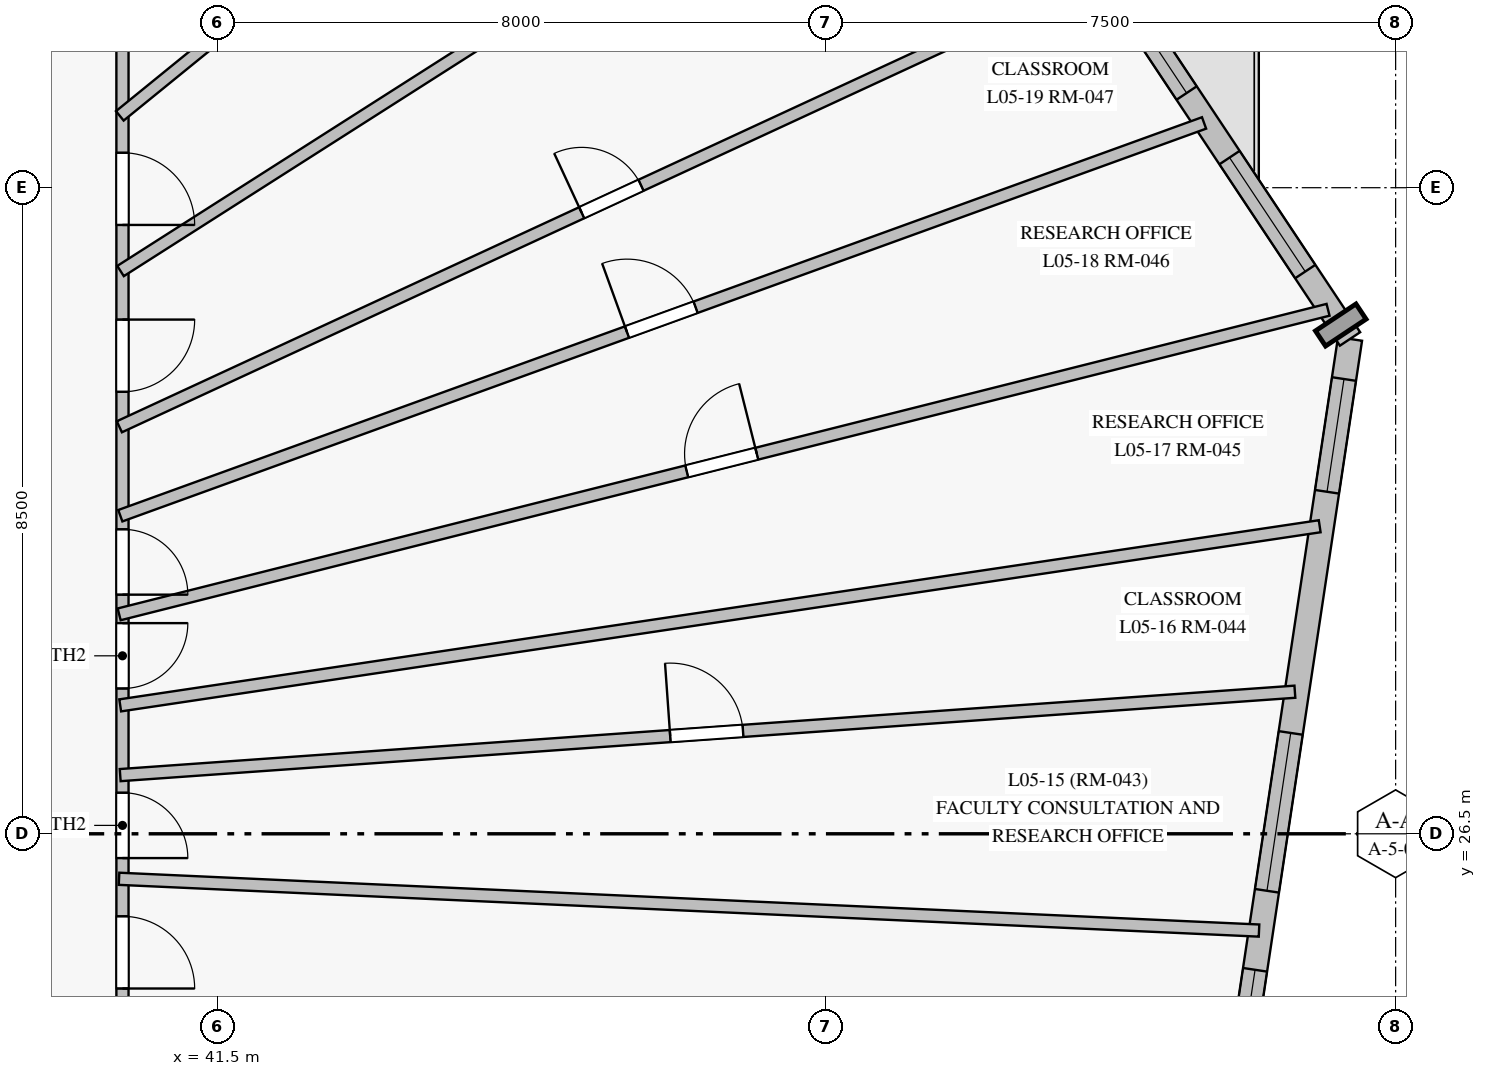
"""IFC4 building model, lengths in metres.
Left out: names, types, materials, properties, quantities, classifications, styles, units other than length and angle.
Written with IfcOpenShell. Run it as: python <this file> out.ifc"""

import sys

from ifc_helpers import new_model, si_unit, direction, frame, frame_2d, origin, origin_with_axes, place, context, subcontext, project, spatial, rectangle, extrude, source, transform, mapped, element, fill, save


model = new_model("IFC4")
c1 = context("Model", 3, precision=1e-05, world=origin(), true_north=direction((0.0, 1.0)))
c2 = subcontext(c1, "Body", "Model", "MODEL_VIEW")
j1 = project(units=[si_unit("LENGTHUNIT", "METRE"), si_unit("PLANEANGLEUNIT", "RADIAN")], contexts=[c1])
p1 = place(None, origin())
s1 = spatial("IfcSite", under=j1, at=p1, CompositionType="ELEMENT")
p2 = place(p1, origin())
s2 = spatial("IfcBuilding", under=s1, at=p2, CompositionType="ELEMENT")
p3 = place(p2, frame((0.0, 0.0, 22.5)))
s3 = spatial("IfcBuildingStorey", under=s2, at=p3, CompositionType="ELEMENT", Elevation=22.5)
p4 = place(p3, frame((54.797, 22.363, 0.0), z_axis=(0.0, 0.0, 1.0), x_axis=(0.148832722849, 0.988862387094, 0.0)))
e1 = element("IfcWall", 1, at=p4, inside=s3, PredefinedType="SOLIDWALL", context=c2, shape_type="SweptSolid", body=[
    extrude(rectangle(XDim=10.767, YDim=0.32, at=frame_2d((5.384, 0.0))), origin(), (0.0, 0.0, 1.0), 3.75),
])
p5 = place(p4, frame((0.574, 0.0, 0.85)))
e2 = element("IfcOpeningElement", 2, at=p5, cuts=e1, PredefinedType="OPENING", context=c2, shape_type="SweptSolid", body=[
    extrude(rectangle(XDim=1.8, YDim=1.85, at=frame_2d((0.9, 0.925))), frame((0.0, 0.17, 0.0), z_axis=(0.0, -1.0, 0.0), x_axis=(1.0, 0.0, 0.0)), (0.0, 0.0, 1.0), 0.34),
])
p6 = place(p4, frame((3.426, 0.0, 0.85)))
e3 = element("IfcOpeningElement", 3, at=p6, cuts=e1, PredefinedType="OPENING", context=c2, shape_type="SweptSolid", body=[
    extrude(rectangle(XDim=2.1, YDim=1.95, at=frame_2d((1.05, 0.975))), frame((0.0, 0.17, 0.0), z_axis=(0.0, -1.0, 0.0), x_axis=(1.0, 0.0, 0.0)), (0.0, 0.0, 1.0), 0.34),
])
p7 = place(p4, frame((8.734, 0.0, 0.85)))
e4 = element("IfcOpeningElement", 4, at=p7, cuts=e1, PredefinedType="OPENING", context=c2, shape_type="SweptSolid", body=[
    extrude(rectangle(XDim=1.5, YDim=1.85, at=frame_2d((0.75, 0.925))), frame((0.0, 0.17, 0.0), z_axis=(0.0, -1.0, 0.0), x_axis=(1.0, 0.0, 0.0)), (0.0, 0.0, 1.0), 0.34),
])
p8 = place(p3, frame((56.4, 33.01, 0.0), z_axis=(0.0, 0.0, 1.0), x_axis=(-0.553428968968, 0.832896377893, 0.0)))
e5 = element("IfcWall", 5, at=p8, inside=s3, PredefinedType="SOLIDWALL", context=c2, shape_type="SweptSolid", body=[
    extrude(rectangle(XDim=13.391, YDim=0.32, at=frame_2d((6.696, 0.0))), origin(), (0.0, 0.0, 1.0), 3.75),
])
p9 = place(p8, frame((1.064, 0.0, 0.85)))
e6 = element("IfcOpeningElement", 6, at=p9, cuts=e5, PredefinedType="OPENING", context=c2, shape_type="SweptSolid", body=[
    extrude(rectangle(XDim=1.8, YDim=1.85, at=frame_2d((0.9, 0.925))), frame((0.0, 0.17, 0.0), z_axis=(0.0, -1.0, 0.0), x_axis=(1.0, 0.0, 0.0)), (0.0, 0.0, 1.0), 0.34),
])
p10 = place(p8, frame((3.884, 0.0, 0.85)))
e7 = element("IfcOpeningElement", 7, at=p10, cuts=e5, PredefinedType="OPENING", context=c2, shape_type="SweptSolid", body=[
    extrude(rectangle(XDim=1.5, YDim=1.85, at=frame_2d((0.75, 0.925))), frame((0.0, 0.17, 0.0), z_axis=(0.0, -1.0, 0.0), x_axis=(1.0, 0.0, 0.0)), (0.0, 0.0, 1.0), 0.34),
])
p11 = place(p8, frame((6.591, 0.0, 0.85)))
e8 = element("IfcOpeningElement", 8, at=p11, cuts=e5, PredefinedType="OPENING", context=c2, shape_type="SweptSolid", body=[
    extrude(rectangle(XDim=2.1, YDim=1.95, at=frame_2d((1.05, 0.975))), frame((0.0, 0.17, 0.0), z_axis=(0.0, -1.0, 0.0), x_axis=(1.0, 0.0, 0.0)), (0.0, 0.0, 1.0), 0.34),
])
p12 = place(p8, frame((9.945, 0.0, 0.85)))
e9 = element("IfcOpeningElement", 9, at=p12, cuts=e5, PredefinedType="OPENING", context=c2, shape_type="SweptSolid", body=[
    extrude(rectangle(XDim=2.1, YDim=1.95, at=frame_2d((1.05, 0.975))), frame((0.0, 0.17, 0.0), z_axis=(0.0, -1.0, 0.0), x_axis=(1.0, 0.0, 0.0)), (0.0, 0.0, 1.0), 0.34),
])
p13 = place(p3, frame((40.25, 37.65, 0.0), z_axis=(0.0, 0.0, 1.0), x_axis=(0.0, -1.0, 0.0)))
e10 = element("IfcWall", 10, at=p13, inside=s3, PredefinedType="PARTITIONING", context=c2, shape_type="SweptSolid", body=[
    extrude(rectangle(XDim=22.3, YDim=0.16, at=frame_2d((11.15, 0.0))), origin(), (0.0, 0.0, 1.0), 3.15),
])
p14 = place(p13, frame((16.25, 0.0, 0.0)))
e11 = element("IfcOpeningElement", 11, at=p14, cuts=e10, PredefinedType="OPENING", context=c2, shape_type="SweptSolid", body=[
    extrude(rectangle(XDim=0.95, YDim=2.15, at=frame_2d((0.475, 1.075))), frame((0.0, 0.09, 0.0), z_axis=(0.0, -1.0, 0.0), x_axis=(1.0, 0.0, 0.0)), (0.0, 0.0, 1.0), 0.18),
])
p15 = place(p13, frame((14.06, 0.0, 0.0)))
e12 = element("IfcOpeningElement", 12, at=p15, cuts=e10, PredefinedType="OPENING", context=c2, shape_type="SweptSolid", body=[
    extrude(rectangle(XDim=0.96, YDim=2.15, at=frame_2d((0.48, 1.075))), frame((0.0, 0.09, 0.0), z_axis=(0.0, -1.0, 0.0), x_axis=(1.0, 0.0, 0.0)), (0.0, 0.0, 1.0), 0.18),
])
p16 = place(p13, frame((12.235, 0.0, 0.0)))
e13 = element("IfcOpeningElement", 13, at=p16, cuts=e10, PredefinedType="OPENING", context=c2, shape_type="SweptSolid", body=[
    extrude(rectangle(XDim=0.95, YDim=2.15, at=frame_2d((0.475, 1.075))), frame((0.0, 0.09, 0.0), z_axis=(0.0, -1.0, 0.0), x_axis=(1.0, 0.0, 0.0)), (0.0, 0.0, 1.0), 0.18),
])
p17 = place(p13, frame((4.385, 0.0, 0.0)))
e14 = element("IfcOpeningElement", 14, at=p17, cuts=e10, PredefinedType="OPENING", context=c2, shape_type="SweptSolid", body=[
    extrude(rectangle(XDim=0.95, YDim=2.15, at=frame_2d((0.475, 1.075))), frame((0.0, 0.09, 0.0), z_axis=(0.0, -1.0, 0.0), x_axis=(1.0, 0.0, 0.0)), (0.0, 0.0, 1.0), 0.18),
])
p18 = place(p13, frame((2.19, 0.0, 0.0)))
e15 = element("IfcOpeningElement", 15, at=p18, cuts=e10, PredefinedType="OPENING", context=c2, shape_type="SweptSolid", body=[
    extrude(rectangle(XDim=0.95, YDim=2.15, at=frame_2d((0.475, 1.075))), frame((0.0, 0.09, 0.0), z_axis=(0.0, -1.0, 0.0), x_axis=(1.0, 0.0, 0.0)), (0.0, 0.0, 1.0), 0.18),
])
p19 = place(p13, frame((17.358, 0.0, 0.0)))
e16 = element("IfcOpeningElement", 16, at=p19, cuts=e10, PredefinedType="OPENING", context=c2, shape_type="SweptSolid", body=[
    extrude(rectangle(XDim=0.95, YDim=2.15, at=frame_2d((0.475, 1.075))), frame((0.0, 0.09, 0.0), z_axis=(0.0, -1.0, 0.0), x_axis=(1.0, 0.0, 0.0)), (0.0, 0.0, 1.0), 0.18),
])
p20 = place(p13, frame((18.489, 0.0, 0.0)))
e17 = element("IfcOpeningElement", 17, at=p20, cuts=e10, PredefinedType="OPENING", context=c2, shape_type="SweptSolid", body=[
    extrude(rectangle(XDim=0.95, YDim=2.15, at=frame_2d((0.475, 1.075))), frame((0.0, 0.09, 0.0), z_axis=(0.0, -1.0, 0.0), x_axis=(1.0, 0.0, 0.0)), (0.0, 0.0, 1.0), 0.18),
])
p21 = place(p13, frame((10.61, 0.0, 0.0)))
e18 = element("IfcOpeningElement", 18, at=p21, cuts=e10, PredefinedType="OPENING", context=c2, shape_type="SweptSolid", body=[
    extrude(rectangle(XDim=0.86, YDim=2.04, at=frame_2d((0.43, 1.02))), frame((0.0, 0.09, 0.0), z_axis=(0.0, -1.0, 0.0), x_axis=(1.0, 0.0, 0.0)), (0.0, 0.0, 1.0), 0.18),
])
p22 = place(p13, frame((8.378, 0.0, 0.0)))
e19 = element("IfcOpeningElement", 19, at=p22, cuts=e10, PredefinedType="OPENING", context=c2, shape_type="SweptSolid", body=[
    extrude(rectangle(XDim=0.86, YDim=2.04, at=frame_2d((0.43, 1.02))), frame((0.0, 0.09, 0.0), z_axis=(0.0, -1.0, 0.0), x_axis=(1.0, 0.0, 0.0)), (0.0, 0.0, 1.0), 0.18),
])
p23 = place(p13, frame((7.144, 0.0, 0.0)))
e20 = element("IfcOpeningElement", 20, at=p23, cuts=e10, PredefinedType="OPENING", context=c2, shape_type="SweptSolid", body=[
    extrude(rectangle(XDim=0.86, YDim=2.04, at=frame_2d((0.43, 1.02))), frame((0.0, 0.09, 0.0), z_axis=(0.0, -1.0, 0.0), x_axis=(1.0, 0.0, 0.0)), (0.0, 0.0, 1.0), 0.18),
])
p24 = place(p3, frame((40.206, 29.387, 0.0), z_axis=(0.0, 0.0, 1.0), x_axis=(0.969703998049, 0.24428294285, 0.0)))
e21 = element("IfcWall", 21, at=p24, inside=s3, PredefinedType="PARTITIONING", context=c2, shape_type="SweptSolid", body=[
    extrude(rectangle(XDim=16.401, YDim=0.16, at=frame_2d((8.201, 0.0))), origin(), (0.0, 0.0, 1.0), 3.75),
])
p25 = place(p24, frame((7.701, 0.0, 0.0)))
e22 = element("IfcOpeningElement", 22, at=p25, cuts=e21, PredefinedType="OPENING", context=c2, shape_type="SweptSolid", body=[
    extrude(rectangle(XDim=0.95, YDim=2.15, at=frame_2d((0.475, 1.075))), frame((0.0, 0.09, 0.0), z_axis=(0.0, -1.0, 0.0), x_axis=(1.0, 0.0, 0.0)), (0.0, 0.0, 1.0), 0.18),
])
p26 = place(p3, frame((40.22, 28.189, 0.0), z_axis=(0.0, 0.0, 1.0), x_axis=(0.989031993376, 0.147701442372, 0.0)))
e23 = element("IfcWall", 23, at=p26, inside=s3, PredefinedType="PARTITIONING", context=c2, shape_type="SweptSolid", body=[
    extrude(rectangle(XDim=15.956, YDim=0.16, at=frame_2d((7.978, 0.0))), origin(), (0.0, 0.0, 1.0), 3.75),
])
p27 = place(p3, frame((40.22, 27.272, 0.0), z_axis=(0.0, 0.0, 1.0), x_axis=(0.997489402504, 0.070815901405, 0.0)))
e24 = element("IfcWall", 24, at=p27, inside=s3, PredefinedType="PARTITIONING", context=c2, shape_type="SweptSolid", body=[
    extrude(rectangle(XDim=15.493, YDim=0.16, at=frame_2d((7.747, 0.0))), origin(), (0.0, 0.0, 1.0), 3.75),
])
p28 = place(p27, frame((7.254, 0.0, 0.0)))
e25 = element("IfcOpeningElement", 25, at=p28, cuts=e24, PredefinedType="OPENING", context=c2, shape_type="SweptSolid", body=[
    extrude(rectangle(XDim=0.96, YDim=2.15, at=frame_2d((0.48, 1.075))), frame((0.0, 0.09, 0.0), z_axis=(0.0, -1.0, 0.0), x_axis=(1.0, 0.0, 0.0)), (0.0, 0.0, 1.0), 0.18),
])
p29 = place(p3, frame((40.222, 30.685, 0.0), z_axis=(0.0, 0.0, 1.0), x_axis=(0.940161852345, 0.340728178166, 0.0)))
e26 = element("IfcWall", 26, at=p29, inside=s3, PredefinedType="PARTITIONING", context=c2, shape_type="SweptSolid", body=[
    extrude(rectangle(XDim=15.165, YDim=0.16, at=frame_2d((7.583, 0.0))), origin(), (0.0, 0.0, 1.0), 3.75),
])
p30 = place(p29, frame((7.09, 0.0, 0.0)))
e27 = element("IfcOpeningElement", 27, at=p30, cuts=e26, PredefinedType="OPENING", context=c2, shape_type="SweptSolid", body=[
    extrude(rectangle(XDim=0.96, YDim=2.15, at=frame_2d((0.48, 1.075))), frame((0.0, 0.09, 0.0), z_axis=(0.0, -1.0, 0.0), x_axis=(1.0, 0.0, 0.0)), (0.0, 0.0, 1.0), 0.18),
])
p31 = place(p3, frame((40.205, 25.908, 0.0), z_axis=(0.0, 0.0, 1.0), x_axis=(0.998969512327, -0.045386269292, 0.0)))
e28 = element("IfcWall", 28, at=p31, inside=s3, PredefinedType="PARTITIONING", context=c2, shape_type="SweptSolid", body=[
    extrude(rectangle(XDim=15.013, YDim=0.16, at=frame_2d((7.507, 0.0))), origin(), (0.0, 0.0, 1.0), 3.75),
])
p32 = place(p3, frame((40.209, 31.855, 0.0), z_axis=(0.0, 0.0, 1.0), x_axis=(0.907470894389, 0.420114955502, 0.0)))
e29 = element("IfcWall", 29, at=p32, inside=s3, PredefinedType="PARTITIONING", context=c2, shape_type="SweptSolid", body=[
    extrude(rectangle(XDim=14.266, YDim=0.16, at=frame_2d((7.133, 0.0))), origin(), (0.0, 0.0, 1.0), 3.75),
])
p33 = place(p32, frame((6.703, 0.0, 0.0)))
e30 = element("IfcOpeningElement", 30, at=p33, cuts=e29, PredefinedType="OPENING", context=c2, shape_type="SweptSolid", body=[
    extrude(rectangle(XDim=0.86, YDim=2.04, at=frame_2d((0.43, 1.02))), frame((0.0, 0.09, 0.0), z_axis=(0.0, -1.0, 0.0), x_axis=(1.0, 0.0, 0.0)), (0.0, 0.0, 1.0), 0.18),
])
p34 = place(p3, frame((40.225, 33.904, 0.0), z_axis=(0.0, 0.0, 1.0), x_axis=(0.843218121952, 0.537571575524, 0.0)))
e31 = element("IfcWall", 31, at=p34, inside=s3, PredefinedType="PARTITIONING", context=c2, shape_type="SweptSolid", body=[
    extrude(rectangle(XDim=12.955, YDim=0.16, at=frame_2d((6.478, 0.0))), origin(), (0.0, 0.0, 1.0), 3.75),
])
p35 = place(p3, frame((40.215, 35.945, 0.0), z_axis=(0.0, 0.0, 1.0), x_axis=(0.77599360837, 0.630740770657, 0.0)))
e32 = element("IfcWall", 32, at=p35, inside=s3, PredefinedType="PARTITIONING", context=c2, shape_type="SweptSolid", body=[
    extrude(rectangle(XDim=7.506, YDim=0.16, at=frame_2d((3.753, 0.0))), origin(), (0.0, 0.0, 1.0), 3.1),
])
m1 = source(origin_with_axes(), c2, "Body", "SweptSolid", [
    extrude(rectangle(XDim=1.8, YDim=1.85, at=frame_2d((0.9, 0.925))), frame((0.0, 0.03, 0.0), z_axis=(0.0, -1.0, 0.0), x_axis=(1.0, 0.0, 0.0)), (0.0, 0.0, 1.0), 0.06),
])
p36 = place(p5, origin())
e33 = element("IfcWindow", 33, at=p36, inside=s3, PartitioningType="SINGLE_PANEL", PredefinedType="WINDOW", context=c2, shape_type="MappedRepresentation", body=[
    mapped(m1, transform((0.0, 0.0, 0.0), scale=1.0)),
])
fill(e2, e33)
m2 = source(origin_with_axes(), c2, "Body", "SweptSolid", [
    extrude(rectangle(XDim=2.1, YDim=1.95, at=frame_2d((1.05, 0.975))), frame((0.0, 0.03, 0.0), z_axis=(0.0, -1.0, 0.0), x_axis=(1.0, 0.0, 0.0)), (0.0, 0.0, 1.0), 0.06),
])
p37 = place(p6, origin())
e34 = element("IfcWindow", 34, at=p37, inside=s3, PartitioningType="SINGLE_PANEL", PredefinedType="WINDOW", context=c2, shape_type="MappedRepresentation", body=[
    mapped(m2, transform((0.0, 0.0, 0.0), scale=1.0)),
])
fill(e3, e34)
m3 = source(origin_with_axes(), c2, "Body", "SweptSolid", [
    extrude(rectangle(XDim=1.5, YDim=1.85, at=frame_2d((0.75, 0.925))), frame((0.0, 0.03, 0.0), z_axis=(0.0, -1.0, 0.0), x_axis=(1.0, 0.0, 0.0)), (0.0, 0.0, 1.0), 0.06),
])
p38 = place(p7, origin())
e35 = element("IfcWindow", 35, at=p38, inside=s3, PartitioningType="SINGLE_PANEL", PredefinedType="WINDOW", context=c2, shape_type="MappedRepresentation", body=[
    mapped(m3, transform((0.0, 0.0, 0.0), scale=1.0)),
])
fill(e4, e35)
p39 = place(p9, origin())
e36 = element("IfcWindow", 36, at=p39, inside=s3, PartitioningType="SINGLE_PANEL", PredefinedType="WINDOW", context=c2, shape_type="MappedRepresentation", body=[
    mapped(m1, transform((0.0, 0.0, 0.0), scale=1.0)),
])
fill(e6, e36)
p40 = place(p10, origin())
e37 = element("IfcWindow", 37, at=p40, inside=s3, PartitioningType="SINGLE_PANEL", PredefinedType="WINDOW", context=c2, shape_type="MappedRepresentation", body=[
    mapped(m3, transform((0.0, 0.0, 0.0), scale=1.0)),
])
fill(e7, e37)
m4 = source(origin_with_axes(), c2, "Body", "SweptSolid", [
    extrude(rectangle(XDim=0.95, YDim=2.15, at=frame_2d((0.475, 1.075))), frame((0.0, 0.025, 0.0), z_axis=(0.0, -1.0, 0.0), x_axis=(1.0, 0.0, 0.0)), (0.0, 0.0, 1.0), 0.05),
])
p41 = place(p16, origin())
e38 = element("IfcDoor", 38, at=p41, inside=s3, OperationType="SINGLE_SWING_RIGHT", PredefinedType="DOOR", context=c2, shape_type="MappedRepresentation", body=[
    mapped(m4, transform((0.0, 0.0, 0.0), scale=1.0)),
])
fill(e13, e38)
p42 = place(p17, origin())
e39 = element("IfcDoor", 39, at=p42, inside=s3, OperationType="SINGLE_SWING_LEFT", PredefinedType="DOOR", context=c2, shape_type="MappedRepresentation", body=[
    mapped(m4, transform((0.0, 0.0, 0.0), scale=1.0)),
])
fill(e14, e39)
p43 = place(p18, origin())
e40 = element("IfcDoor", 40, at=p43, inside=s3, OperationType="SINGLE_SWING_RIGHT", PredefinedType="DOOR", context=c2, shape_type="MappedRepresentation", body=[
    mapped(m4, transform((0.0, 0.0, 0.0), scale=1.0)),
])
fill(e15, e40)
m5 = source(origin_with_axes(), c2, "Body", "SweptSolid", [
    extrude(rectangle(XDim=0.96, YDim=2.15, at=frame_2d((0.48, 1.075))), frame((0.0, 0.025, 0.0), z_axis=(0.0, -1.0, 0.0), x_axis=(1.0, 0.0, 0.0)), (0.0, 0.0, 1.0), 0.05),
])
p44 = place(p28, origin())
e41 = element("IfcDoor", 41, at=p44, inside=s3, OperationType="SINGLE_SWING_LEFT", PredefinedType="DOOR", context=c2, shape_type="MappedRepresentation", body=[
    mapped(m5, transform((0.0, 0.0, 0.0), scale=1.0)),
])
fill(e25, e41)
p45 = place(p25, origin())
e42 = element("IfcDoor", 42, at=p45, inside=s3, OperationType="SINGLE_SWING_RIGHT", PredefinedType="DOOR", context=c2, shape_type="MappedRepresentation", body=[
    mapped(m4, transform((0.0, 0.0, 0.0), scale=1.0)),
])
fill(e22, e42)
p46 = place(p30, origin())
e43 = element("IfcDoor", 43, at=p46, inside=s3, OperationType="SINGLE_SWING_LEFT", PredefinedType="DOOR", context=c2, shape_type="MappedRepresentation", body=[
    mapped(m5, transform((0.0, 0.0, 0.0), scale=1.0)),
])
fill(e27, e43)
m6 = source(origin_with_axes(), c2, "Body", "SweptSolid", [
    extrude(rectangle(XDim=0.86, YDim=2.04, at=frame_2d((0.43, 1.02))), frame((0.0, 0.025, 0.0), z_axis=(0.0, -1.0, 0.0), x_axis=(1.0, 0.0, 0.0)), (0.0, 0.0, 1.0), 0.05),
])
p47 = place(p21, origin())
e44 = element("IfcDoor", 44, at=p47, inside=s3, OperationType="SINGLE_SWING_RIGHT", PredefinedType="DOOR", context=c2, shape_type="MappedRepresentation", body=[
    mapped(m6, transform((0.0, 0.0, 0.0), scale=1.0)),
])
fill(e18, e44)
p48 = place(p22, origin())
e45 = element("IfcDoor", 45, at=p48, inside=s3, OperationType="SINGLE_SWING_LEFT", PredefinedType="DOOR", context=c2, shape_type="MappedRepresentation", body=[
    mapped(m6, transform((0.0, 0.0, 0.0), scale=1.0)),
])
fill(e19, e45)
p49 = place(p23, origin())
e46 = element("IfcDoor", 46, at=p49, inside=s3, OperationType="SINGLE_SWING_RIGHT", PredefinedType="DOOR", context=c2, shape_type="MappedRepresentation", body=[
    mapped(m6, transform((0.0, 0.0, 0.0), scale=1.0)),
])
fill(e20, e46)
p50 = place(p33, origin())
e47 = element("IfcDoor", 47, at=p50, inside=s3, OperationType="SINGLE_SWING_LEFT", PredefinedType="DOOR", context=c2, shape_type="MappedRepresentation", body=[
    mapped(m6, transform((0.0, 0.0, 0.0), scale=1.0)),
])
fill(e30, e47)
save(model, sys.argv[1])
